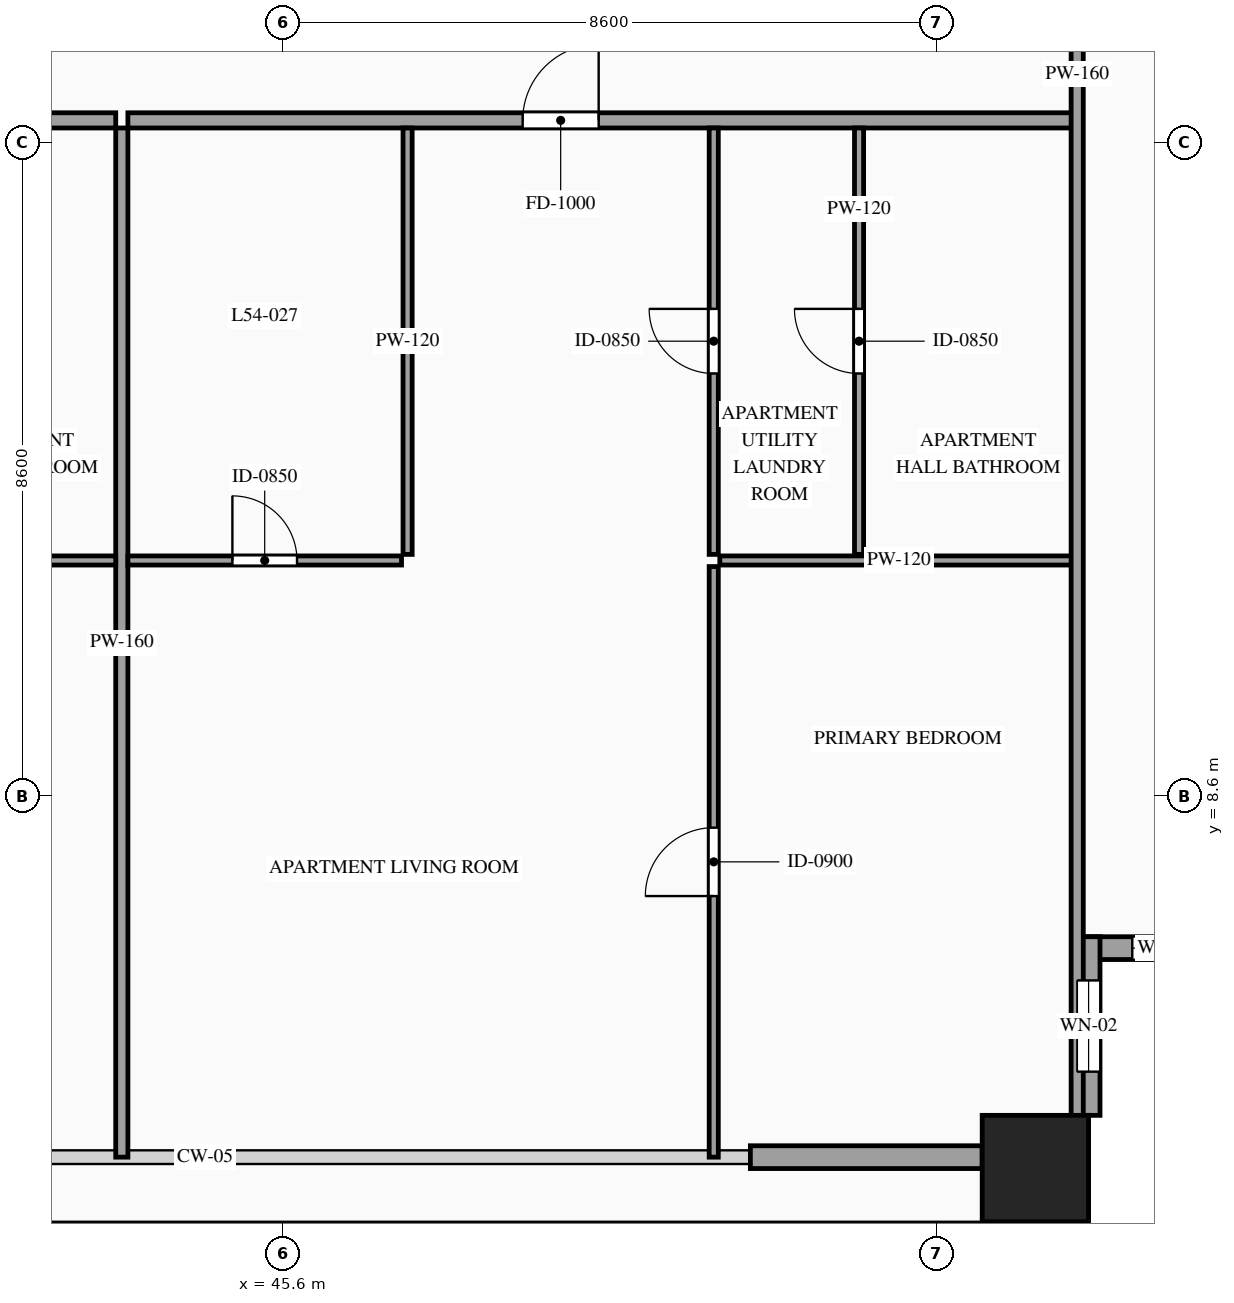
"""IFC4 building model, lengths in metres.
Left out: names, types, materials, properties, quantities, classifications, styles, units other than length and angle.
Written with IfcOpenShell. Run it as: python <this file> out.ifc"""

import sys

from ifc_helpers import new_model, si_unit, direction, frame, frame_2d, origin, origin_2d, place, context, subcontext, project, spatial, rectangle, hollow_rectangle, extrude, source, transform, mapped, element, fill, save


model = new_model("IFC4")
c1 = context("Model", 3, precision=1e-05, world=origin(), true_north=direction((0.0, 1.0)))
c2 = subcontext(c1, "Body", "Model", "MODEL_VIEW")
j1 = project(units=[si_unit("LENGTHUNIT", "METRE"), si_unit("PLANEANGLEUNIT", "RADIAN")], contexts=[c1])
p1 = place(None, origin())
s1 = spatial("IfcSite", under=j1, at=p1, CompositionType="ELEMENT")
p2 = place(p1, origin())
s2 = spatial("IfcBuilding", under=s1, at=p2, CompositionType="ELEMENT")
p3 = place(p2, frame((0.0, 0.0, 205.5)))
s3 = spatial("IfcBuildingStorey", under=s2, at=p3, CompositionType="ELEMENT", Elevation=205.5)
m1 = source(origin(), c2, "Body", "SweptSolid", [
    extrude(hollow_rectangle(XDim=1.4, YDim=1.4, WallThickness=0.06, at=origin_2d()), origin(), (0.0, 0.0, 1.0), 3.5),
])
p4 = place(p3, frame((55.5, 3.7, 0.0), z_axis=(0.0, 0.0, 1.0), x_axis=(1.0, 0.0, 0.0)))
e1 = element("IfcColumn", 1, at=p4, inside=s3, PredefinedType="COLUMN", context=c2, shape_type="MappedRepresentation", body=[
    mapped(m1, transform((0.0, 0.0, 0.0), scale=1.0)),
])
p5 = place(p3, frame((56.05, 6.6, 0.0), z_axis=(0.0, 0.0, 1.0), x_axis=(1.0, 0.0, 0.0)))
e2 = element("IfcWall", 2, at=p5, inside=s3, PredefinedType="SOLIDWALL", context=c2, shape_type="SweptSolid", body=[
    extrude(rectangle(XDim=2.35, YDim=0.3, at=frame_2d((1.175, 0.0))), origin(), (0.0, 0.0, 1.0), 3.28),
])
p6 = place(p5, frame((0.725, 0.0, 0.85)))
e3 = element("IfcOpeningElement", 3, at=p6, cuts=e2, PredefinedType="OPENING", context=c2, shape_type="SweptSolid", body=[
    extrude(rectangle(XDim=0.9, YDim=1.5, at=frame_2d((0.45, 0.75))), frame((0.0, 0.165, 0.0), z_axis=(0.0, -1.0, 0.0), x_axis=(1.0, 0.0, 0.0)), (0.0, 0.0, 1.0), 0.33),
])
p7 = place(p3, frame((56.2, 4.4, 0.0), z_axis=(0.0, 0.0, 1.0), x_axis=(0.0, 1.0, 0.0)))
e4 = element("IfcWall", 4, at=p7, inside=s3, PredefinedType="SOLIDWALL", context=c2, shape_type="SweptSolid", body=[
    extrude(rectangle(XDim=2.35, YDim=0.3, at=frame_2d((1.175, 0.0))), origin(), (0.0, 0.0, 1.0), 3.28),
])
p8 = place(p7, frame((0.575, 0.0, 0.85)))
e5 = element("IfcOpeningElement", 5, at=p8, cuts=e4, PredefinedType="OPENING", context=c2, shape_type="SweptSolid", body=[
    extrude(rectangle(XDim=1.2, YDim=2.1, at=frame_2d((0.6, 1.05))), frame((0.0, 0.165, 0.0), z_axis=(0.0, -1.0, 0.0), x_axis=(1.0, 0.0, 0.0)), (0.0, 0.0, 1.0), 0.33),
])
m2 = source(origin(), c2, "Body", "SweptSolid", [
    extrude(rectangle(XDim=3.05, YDim=0.3, at=frame_2d((1.525, 0.0))), origin(), (0.0, 0.0, 1.0), 2.835),
])
p9 = place(p3, frame((51.75, 3.85, 0.0), z_axis=(0.0, 0.0, 1.0), x_axis=(1.0, 0.0, 0.0)))
e6 = element("IfcWall", 6, at=p9, inside=s3, PredefinedType="SOLIDWALL", context=c2, shape_type="MappedRepresentation", body=[
    mapped(m2, transform((0.0, 0.0, 0.0), scale=1.0)),
])
p10 = place(p3, frame((30.6, 17.49, 0.0), z_axis=(0.0, 0.0, 1.0), x_axis=(1.0, 0.0, 0.0)))
e7 = element("IfcWall", 7, at=p10, inside=s3, PredefinedType="PARTITIONING", context=c2, shape_type="SweptSolid", body=[
    extrude(rectangle(XDim=12.8, YDim=0.2, at=frame_2d((6.4, 0.0))), origin(), (0.0, 0.0, 1.0), 3.28),
])
p11 = place(p10, frame((5.344, 0.0, 0.0)))
e8 = element("IfcOpeningElement", 8, at=p11, cuts=e7, PredefinedType="OPENING", context=c2, shape_type="SweptSolid", body=[
    extrude(rectangle(XDim=1.0, YDim=2.2, at=frame_2d((0.5, 1.1))), frame((0.0, 0.115, 0.0), z_axis=(0.0, -1.0, 0.0), x_axis=(1.0, 0.0, 0.0)), (0.0, 0.0, 1.0), 0.23),
])
m3 = source(origin(), c2, "Body", "SweptSolid", [
    extrude(rectangle(XDim=13.54, YDim=0.16, at=frame_2d((6.77, 0.0))), origin(), (0.0, 0.0, 1.0), 3.28),
])
p12 = place(p3, frame((43.48, 3.85, 0.0), z_axis=(0.0, 0.0, 1.0), x_axis=(0.0, 1.0, 0.0)))
e9 = element("IfcWall", 9, at=p12, inside=s3, PredefinedType="PARTITIONING", context=c2, shape_type="MappedRepresentation", body=[
    mapped(m3, transform((0.0, 0.0, 0.0), scale=1.0)),
])
m4 = source(origin(), c2, "Body", "SweptSolid", [
    extrude(rectangle(XDim=4.712, YDim=0.12, at=frame_2d((2.356, 0.0))), origin(), (0.0, 0.0, 1.0), 2.875),
])
p13 = place(p3, frame((38.688, 11.7, 0.0), z_axis=(0.0, 0.0, 1.0), x_axis=(1.0, 0.0, 0.0)))
e10 = element("IfcWall", 10, at=p13, inside=s3, PredefinedType="PARTITIONING", context=c2, shape_type="MappedRepresentation", body=[
    mapped(m4, transform((0.0, 0.0, 0.0), scale=1.0)),
])
p14 = place(p3, frame((43.56, 17.49, 0.0), z_axis=(0.0, 0.0, 1.0), x_axis=(1.0, 0.0, 0.0)))
e11 = element("IfcWall", 11, at=p14, inside=s3, PredefinedType="PARTITIONING", context=c2, shape_type="SweptSolid", body=[
    extrude(rectangle(XDim=12.5, YDim=0.2, at=frame_2d((6.25, 0.0))), origin(), (0.0, 0.0, 1.0), 3.28),
])
p15 = place(p14, frame((5.194, 0.0, 0.0)))
e12 = element("IfcOpeningElement", 12, at=p15, cuts=e11, PredefinedType="OPENING", context=c2, shape_type="SweptSolid", body=[
    extrude(rectangle(XDim=1.0, YDim=2.2, at=frame_2d((0.5, 1.1))), frame((0.0, 0.115, 0.0), z_axis=(0.0, -1.0, 0.0), x_axis=(1.0, 0.0, 0.0)), (0.0, 0.0, 1.0), 0.23),
])
p16 = place(p3, frame((43.56, 11.7, 0.0), z_axis=(0.0, 0.0, 1.0), x_axis=(1.0, 0.0, 0.0)))
e13 = element("IfcWall", 13, at=p16, inside=s3, PredefinedType="PARTITIONING", context=c2, shape_type="SweptSolid", body=[
    extrude(rectangle(XDim=3.6, YDim=0.12, at=frame_2d((1.8, 0.0))), origin(), (0.0, 0.0, 1.0), 2.875),
])
p17 = place(p16, frame((1.375, 0.0, 0.0)))
e14 = element("IfcOpeningElement", 14, at=p17, cuts=e13, PredefinedType="OPENING", context=c2, shape_type="SweptSolid", body=[
    extrude(rectangle(XDim=0.85, YDim=2.1, at=frame_2d((0.425, 1.05))), frame((0.0, 0.075, 0.0), z_axis=(0.0, -1.0, 0.0), x_axis=(1.0, 0.0, 0.0)), (0.0, 0.0, 1.0), 0.15),
])
m5 = source(origin(), c2, "Body", "SweptSolid", [
    extrude(rectangle(XDim=5.61, YDim=0.12, at=frame_2d((2.805, 0.0))), origin(), (0.0, 0.0, 1.0), 3.28),
])
p18 = place(p3, frame((47.24, 11.78, 0.0), z_axis=(0.0, 0.0, 1.0), x_axis=(0.0, 1.0, 0.0)))
e15 = element("IfcWall", 15, at=p18, inside=s3, PredefinedType="PARTITIONING", context=c2, shape_type="MappedRepresentation", body=[
    mapped(m5, transform((0.0, 0.0, 0.0), scale=1.0)),
])
p19 = place(p3, frame((53.18, 11.78, 0.0), z_axis=(0.0, 0.0, 1.0), x_axis=(0.0, 1.0, 0.0)))
e16 = element("IfcWall", 16, at=p19, inside=s3, PredefinedType="PARTITIONING", context=c2, shape_type="SweptSolid", body=[
    extrude(rectangle(XDim=5.61, YDim=0.12, at=frame_2d((2.805, 0.0))), origin(), (0.0, 0.0, 1.0), 3.28),
])
p20 = place(p19, frame((2.38, 0.0, 0.0)))
e17 = element("IfcOpeningElement", 17, at=p20, cuts=e16, PredefinedType="OPENING", context=c2, shape_type="SweptSolid", body=[
    extrude(rectangle(XDim=0.85, YDim=2.1, at=frame_2d((0.425, 1.05))), frame((0.0, 0.075, 0.0), z_axis=(0.0, -1.0, 0.0), x_axis=(1.0, 0.0, 0.0)), (0.0, 0.0, 1.0), 0.15),
])
m6 = source(origin(), c2, "Body", "SweptSolid", [
    extrude(rectangle(XDim=4.712, YDim=0.12, at=frame_2d((2.356, 0.0))), origin(), (0.0, 0.0, 1.0), 3.28),
])
p21 = place(p3, frame((51.348, 11.7, 0.0), z_axis=(0.0, 0.0, 1.0), x_axis=(1.0, 0.0, 0.0)))
e18 = element("IfcWall", 18, at=p21, inside=s3, PredefinedType="PARTITIONING", context=c2, shape_type="MappedRepresentation", body=[
    mapped(m6, transform((0.0, 0.0, 0.0), scale=1.0)),
])
p22 = place(p3, frame((51.268, 3.85, 0.0), z_axis=(0.0, 0.0, 1.0), x_axis=(0.0, 1.0, 0.0)))
e19 = element("IfcWall", 19, at=p22, inside=s3, PredefinedType="PARTITIONING", context=c2, shape_type="SweptSolid", body=[
    extrude(rectangle(XDim=7.77, YDim=0.12, at=frame_2d((3.885, 0.0))), origin(), (0.0, 0.0, 1.0), 3.28),
])
p23 = place(p22, frame((3.435, 0.0, 0.0)))
e20 = element("IfcOpeningElement", 20, at=p23, cuts=e19, PredefinedType="OPENING", context=c2, shape_type="SweptSolid", body=[
    extrude(rectangle(XDim=0.9, YDim=2.15, at=frame_2d((0.45, 1.075))), frame((0.0, 0.075, 0.0), z_axis=(0.0, -1.0, 0.0), x_axis=(1.0, 0.0, 0.0)), (0.0, 0.0, 1.0), 0.15),
])
p24 = place(p3, frame((51.268, 11.78, 0.0), z_axis=(0.0, 0.0, 1.0), x_axis=(0.0, 1.0, 0.0)))
e21 = element("IfcWall", 21, at=p24, inside=s3, PredefinedType="PARTITIONING", context=c2, shape_type="SweptSolid", body=[
    extrude(rectangle(XDim=5.61, YDim=0.12, at=frame_2d((2.805, 0.0))), origin(), (0.0, 0.0, 1.0), 3.28),
])
p25 = place(p24, frame((2.38, 0.0, 0.0)))
e22 = element("IfcOpeningElement", 22, at=p25, cuts=e21, PredefinedType="OPENING", context=c2, shape_type="SweptSolid", body=[
    extrude(rectangle(XDim=0.85, YDim=2.1, at=frame_2d((0.425, 1.05))), frame((0.0, 0.075, 0.0), z_axis=(0.0, -1.0, 0.0), x_axis=(1.0, 0.0, 0.0)), (0.0, 0.0, 1.0), 0.15),
])
m7 = source(origin(), c2, "Body", "SweptSolid", [
    extrude(rectangle(XDim=28.19, YDim=0.16, at=frame_2d((14.095, 0.0))), origin(), (0.0, 0.0, 1.0), 3.28),
])
p26 = place(p3, frame((56.05, 4.0, 0.0), z_axis=(0.0, 0.0, 1.0), x_axis=(0.0, 1.0, 0.0)))
e23 = element("IfcWall", 23, at=p26, inside=s3, PredefinedType="PARTITIONING", context=c2, shape_type="MappedRepresentation", body=[
    mapped(m7, transform((0.0, 0.0, 0.0), scale=1.0)),
])
m8 = source(origin(), c2, "Body", "SweptSolid", [
    extrude(rectangle(XDim=0.9, YDim=1.5, at=frame_2d((0.45, 0.75))), frame((0.0, 0.03, 0.0), z_axis=(0.0, -1.0, 0.0), x_axis=(1.0, 0.0, 0.0)), (0.0, 0.0, 1.0), 0.06),
])
p27 = place(p6, origin())
e24 = element("IfcWindow", 24, at=p27, inside=s3, PartitioningType="SINGLE_PANEL", PredefinedType="WINDOW", context=c2, shape_type="MappedRepresentation", body=[
    mapped(m8, transform((0.0, 0.0, 0.0), scale=1.0)),
])
fill(e3, e24)
m9 = source(origin(), c2, "Body", "SweptSolid", [
    extrude(rectangle(XDim=1.2, YDim=2.1, at=frame_2d((0.6, 1.05))), frame((0.0, 0.03, 0.0), z_axis=(0.0, -1.0, 0.0), x_axis=(1.0, 0.0, 0.0)), (0.0, 0.0, 1.0), 0.06),
])
p28 = place(p8, origin())
e25 = element("IfcWindow", 25, at=p28, inside=s3, PartitioningType="SINGLE_PANEL", PredefinedType="WINDOW", context=c2, shape_type="MappedRepresentation", body=[
    mapped(m9, transform((0.0, 0.0, 0.0), scale=1.0)),
])
fill(e5, e25)
m10 = source(origin(), c2, "Body", "SweptSolid", [
    extrude(rectangle(XDim=1.0, YDim=2.2, at=frame_2d((0.5, 1.1))), frame((0.0, 0.025, 0.0), z_axis=(0.0, -1.0, 0.0), x_axis=(1.0, 0.0, 0.0)), (0.0, 0.0, 1.0), 0.05),
])
p29 = place(p15, origin())
e26 = element("IfcDoor", 26, at=p29, inside=s3, OperationType="SINGLE_SWING_RIGHT", PredefinedType="DOOR", context=c2, shape_type="MappedRepresentation", body=[
    mapped(m10, transform((0.0, 0.0, 0.0), scale=1.0)),
])
fill(e12, e26)
m11 = source(origin(), c2, "Body", "SweptSolid", [
    extrude(rectangle(XDim=0.85, YDim=2.1, at=frame_2d((0.425, 1.05))), frame((0.0, 0.025, 0.0), z_axis=(0.0, -1.0, 0.0), x_axis=(1.0, 0.0, 0.0)), (0.0, 0.0, 1.0), 0.05),
])
p30 = place(p17, origin())
e27 = element("IfcDoor", 27, at=p30, inside=s3, OperationType="SINGLE_SWING_LEFT", PredefinedType="DOOR", context=c2, shape_type="MappedRepresentation", body=[
    mapped(m11, transform((0.0, 0.0, 0.0), scale=1.0)),
])
fill(e14, e27)
p31 = place(p20, origin())
e28 = element("IfcDoor", 28, at=p31, inside=s3, OperationType="SINGLE_SWING_RIGHT", PredefinedType="DOOR", context=c2, shape_type="MappedRepresentation", body=[
    mapped(m11, transform((0.0, 0.0, 0.0), scale=1.0)),
])
fill(e17, e28)
m12 = source(origin(), c2, "Body", "SweptSolid", [
    extrude(rectangle(XDim=0.9, YDim=2.15, at=frame_2d((0.45, 1.075))), frame((0.0, 0.025, 0.0), z_axis=(0.0, -1.0, 0.0), x_axis=(1.0, 0.0, 0.0)), (0.0, 0.0, 1.0), 0.05),
])
p32 = place(p23, origin())
e29 = element("IfcDoor", 29, at=p32, inside=s3, OperationType="SINGLE_SWING_LEFT", PredefinedType="DOOR", context=c2, shape_type="MappedRepresentation", body=[
    mapped(m12, transform((0.0, 0.0, 0.0), scale=1.0)),
])
fill(e20, e29)
p33 = place(p25, origin())
e30 = element("IfcDoor", 30, at=p33, inside=s3, OperationType="SINGLE_SWING_RIGHT", PredefinedType="DOOR", context=c2, shape_type="MappedRepresentation", body=[
    mapped(m11, transform((0.0, 0.0, 0.0), scale=1.0)),
])
fill(e22, e30)
save(model, sys.argv[1])
